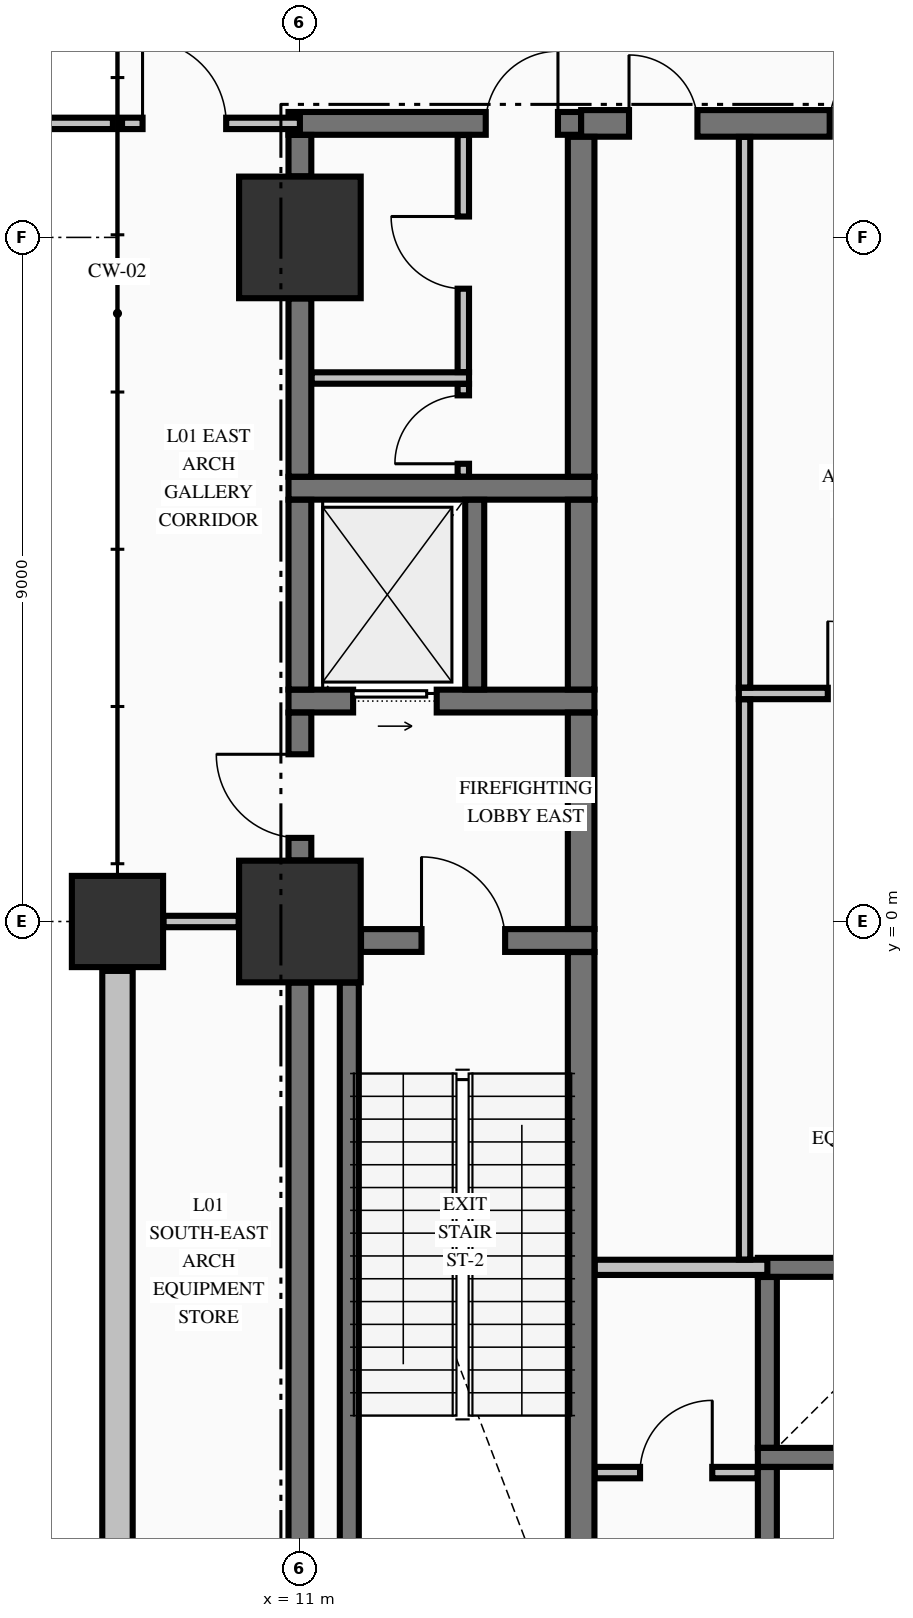
"""IFC4 building model, lengths in metres.
Left out: names, types, materials, properties, quantities, classifications, styles, units other than length and angle.
Written with IfcOpenShell. Run it as: python <this file> out.ifc"""

import sys

from ifc_helpers import new_model, si_unit, direction, frame, frame_2d, origin, origin_2d, place, context, subcontext, project, spatial, rectangle, extrude, element, fill, save


model = new_model("IFC4")
c1 = context("Model", 3, precision=1e-05, world=origin(), true_north=direction((0.0, 1.0)))
c2 = subcontext(c1, "Body", "Model", "MODEL_VIEW")
j1 = project(units=[si_unit("LENGTHUNIT", "METRE"), si_unit("PLANEANGLEUNIT", "RADIAN")], contexts=[c1])
p1 = place(None, origin())
s1 = spatial("IfcSite", under=j1, at=p1, CompositionType="ELEMENT")
p2 = place(p1, origin())
s2 = spatial("IfcBuilding", under=s1, at=p2, CompositionType="ELEMENT")
p3 = place(p2, frame((0.0, 0.0, 5.44)))
s3 = spatial("IfcBuildingStorey", under=s2, at=p3, CompositionType="ELEMENT", Elevation=5.44)
for number, where, z_axis, x_axis in (
    (1, (11.0, 0.0, 0.0), (0.0, 0.0, 1.0), (1.0, 0.0, 0.0)),
    (2, (11.0, 9.0, 0.0), (0.0, 0.0, 1.0), (1.0, 0.0, 0.0)),
):
    element("IfcColumn", number, at=place(p3, frame(where, z_axis=z_axis, x_axis=x_axis)), inside=s3, PredefinedType="COLUMN", context=c2, shape_type="SweptSolid", body=[
        extrude(rectangle(XDim=1.6, YDim=1.6, at=origin_2d()), origin(), (0.0, 0.0, 1.0), 5.09),
    ])
p4 = place(p3, frame((8.6, 0.0, 0.0), z_axis=(0.0, 0.0, 1.0), x_axis=(1.0, 0.0, 0.0)))
e3 = element("IfcColumn", 3, at=p4, inside=s3, PredefinedType="COLUMN", context=c2, shape_type="SweptSolid", body=[
    extrude(rectangle(XDim=1.2, YDim=1.2, at=origin_2d()), origin(), (0.0, 0.0, 1.0), 5.09),
])
p5 = place(p3, frame((8.6, -0.65, 0.0), z_axis=(0.0, 0.0, 1.0), x_axis=(0.0, -1.0, 0.0)))
e4 = element("IfcWall", 4, at=p5, inside=s3, PredefinedType="STANDARD", context=c2, shape_type="SweptSolid", body=[
    extrude(rectangle(XDim=24.72, YDim=0.4, at=frame_2d((12.36, 0.0))), origin(), (0.0, 0.0, 1.0), 4.132),
])
for number, where, z_axis, x_axis in (
    (5, (17.025, -7.05, 0.0), (0.0, 0.0, 1.0), (1.0, 0.0, 0.0)),
    (6, (17.025, -4.55, 0.0), (0.0, 0.0, 1.0), (1.0, 0.0, 0.0)),
):
    element("IfcWall", number, at=place(p3, frame(where, z_axis=z_axis, x_axis=x_axis)), inside=s3, PredefinedType="SOLIDWALL", context=c2, shape_type="SweptSolid", body=[
        extrude(rectangle(XDim=3.15, YDim=0.25, at=frame_2d((1.575, 0.0))), origin(), (0.0, 0.0, 1.0), 5.09),
    ])
p6 = place(p3, frame((11.804, -0.25, 0.0), z_axis=(0.0, 0.0, 1.0), x_axis=(1.0, 0.0, 0.0)))
e7 = element("IfcWall", 7, at=p6, inside=s3, PredefinedType="SHEAR", context=c2, shape_type="SweptSolid", body=[
    extrude(rectangle(XDim=3.071, YDim=0.3, at=frame_2d((1.536, 0.0))), origin(), (0.0, 0.0, 1.0), 5.09),
])
p7 = place(p6, frame((0.796, 0.0, 0.0)))
e8 = element("IfcOpeningElement", 8, at=p7, cuts=e7, PredefinedType="OPENING", context=c2, shape_type="SweptSolid", body=[
    extrude(rectangle(XDim=1.1, YDim=2.15, at=frame_2d((0.55, 1.075))), frame((0.0, 0.16, 0.0), z_axis=(0.0, -1.0, 0.0), x_axis=(1.0, 0.0, 0.0)), (0.0, 0.0, 1.0), 0.32),
])
p8 = place(p3, frame((10.85, 2.9, 0.0), z_axis=(0.0, 0.0, 1.0), x_axis=(1.0, 0.0, 0.0)))
e9 = element("IfcWall", 9, at=p8, inside=s3, PredefinedType="SHEAR", context=c2, shape_type="SweptSolid", body=[
    extrude(rectangle(XDim=4.025, YDim=0.3, at=frame_2d((2.012, 0.0))), origin(), (0.0, 0.0, 1.0), 5.09),
])
p9 = place(p8, frame((0.85, 0.0, 0.0)))
e10 = element("IfcOpeningElement", 10, at=p9, cuts=e9, PredefinedType="OPENING", context=c2, shape_type="SweptSolid", body=[
    extrude(rectangle(XDim=1.1, YDim=2.2, at=frame_2d((0.55, 1.1))), frame((0.0, 0.16, 0.0), z_axis=(0.0, -1.0, 0.0), x_axis=(1.0, 0.0, 0.0)), (0.0, 0.0, 1.0), 0.32),
])
p10 = place(p3, frame((10.85, 5.7, 0.0), z_axis=(0.0, 0.0, 1.0), x_axis=(1.0, 0.0, 0.0)))
e11 = element("IfcWall", 11, at=p10, inside=s3, PredefinedType="SHEAR", context=c2, shape_type="SweptSolid", body=[
    extrude(rectangle(XDim=4.025, YDim=0.3, at=frame_2d((2.012, 0.0))), origin(), (0.0, 0.0, 1.0), 5.09),
])
p11 = place(p3, frame((10.85, 10.5, 0.0), z_axis=(0.0, 0.0, 1.0), x_axis=(1.0, 0.0, 0.0)))
e12 = element("IfcWall", 12, at=p11, inside=s3, PredefinedType="SHEAR", context=c2, shape_type="SweptSolid", body=[
    extrude(rectangle(XDim=3.85, YDim=0.3, at=frame_2d((1.925, 0.0))), origin(), (0.0, 0.0, 1.0), 5.09),
])
p12 = place(p11, frame((2.595, 0.0, 0.0)))
e13 = element("IfcOpeningElement", 13, at=p12, cuts=e12, PredefinedType="OPENING", context=c2, shape_type="SweptSolid", body=[
    extrude(rectangle(XDim=0.95, YDim=2.15, at=frame_2d((0.475, 1.075))), frame((0.0, 0.16, 0.0), z_axis=(0.0, -1.0, 0.0), x_axis=(1.0, 0.0, 0.0)), (0.0, 0.0, 1.0), 0.32),
])
p13 = place(p3, frame((14.7, 10.5, 0.0), z_axis=(0.0, 0.0, 1.0), x_axis=(1.0, 0.0, 0.0)))
e14 = element("IfcWall", 14, at=p13, inside=s3, PredefinedType="SHEAR", context=c2, shape_type="SweptSolid", body=[
    extrude(rectangle(XDim=5.475, YDim=0.35, at=frame_2d((2.738, 0.0))), origin(), (0.0, 0.0, 1.0), 5.09),
])
p14 = place(p13, frame((0.63, 0.0, 0.0)))
e15 = element("IfcOpeningElement", 15, at=p14, cuts=e14, PredefinedType="OPENING", context=c2, shape_type="SweptSolid", body=[
    extrude(rectangle(XDim=0.9, YDim=2.15, at=frame_2d((0.45, 1.075))), frame((0.0, 0.185, 0.0), z_axis=(0.0, -1.0, 0.0), x_axis=(1.0, 0.0, 0.0)), (0.0, 0.0, 1.0), 0.37),
])
p15 = place(p13, frame((3.27, 0.0, 0.0)))
e16 = element("IfcOpeningElement", 16, at=p15, cuts=e14, PredefinedType="OPENING", context=c2, shape_type="SweptSolid", body=[
    extrude(rectangle(XDim=0.9, YDim=2.15, at=frame_2d((0.45, 1.075))), frame((0.0, 0.185, 0.0), z_axis=(0.0, -1.0, 0.0), x_axis=(1.0, 0.0, 0.0)), (0.0, 0.0, 1.0), 0.37),
])
p16 = place(p3, frame((14.878, -7.25, 0.0), z_axis=(0.0, 0.0, 1.0), x_axis=(1.0, 0.0, 0.0)))
e17 = element("IfcWall", 17, at=p16, inside=s3, PredefinedType="PARTITIONING", context=c2, shape_type="SweptSolid", body=[
    extrude(rectangle(XDim=2.144, YDim=0.15, at=frame_2d((1.072, 0.0))), origin(), (0.0, 0.0, 1.0), 5.09),
])
p17 = place(p16, frame((0.597, 0.0, 0.0)))
e18 = element("IfcOpeningElement", 18, at=p17, cuts=e17, PredefinedType="OPENING", context=c2, shape_type="SweptSolid", body=[
    extrude(rectangle(XDim=0.95, YDim=2.15, at=frame_2d((0.475, 1.075))), frame((0.0, 0.085, 0.0), z_axis=(0.0, -1.0, 0.0), x_axis=(1.0, 0.0, 0.0)), (0.0, 0.0, 1.0), 0.17),
])
p18 = place(p3, frame((14.878, -4.55, 0.0), z_axis=(0.0, 0.0, 1.0), x_axis=(1.0, 0.0, 0.0)))
e19 = element("IfcWall", 19, at=p18, inside=s3, PredefinedType="PARTITIONING", context=c2, shape_type="SweptSolid", body=[
    extrude(rectangle(XDim=2.272, YDim=0.2, at=frame_2d((1.136, 0.0))), origin(), (0.0, 0.0, 1.0), 5.09),
])
p19 = place(p3, frame((9.206, 0.0, 0.0), z_axis=(0.0, 0.0, 1.0), x_axis=(1.0, 0.0, 0.0)))
e20 = element("IfcWall", 20, at=p19, inside=s3, PredefinedType="PARTITIONING", context=c2, shape_type="SweptSolid", body=[
    extrude(rectangle(XDim=0.988, YDim=0.15, at=frame_2d((0.494, 0.0))), origin(), (0.0, 0.0, 1.0), 4.132),
])
p20 = place(p3, frame((16.775, 3.0, 0.0), z_axis=(0.0, 0.0, 1.0), x_axis=(1.0, 0.0, 0.0)))
e21 = element("IfcWall", 21, at=p20, inside=s3, PredefinedType="PARTITIONING", context=c2, shape_type="SweptSolid", body=[
    extrude(rectangle(XDim=3.047, YDim=0.15, at=frame_2d((1.523, 0.0))), origin(), (0.0, 0.0, 1.0), 5.09),
])
p21 = place(p20, frame((1.17, 0.0, 0.0)))
e22 = element("IfcOpeningElement", 22, at=p21, cuts=e21, PredefinedType="OPENING", context=c2, shape_type="SweptSolid", body=[
    extrude(rectangle(XDim=0.95, YDim=2.15, at=frame_2d((0.475, 1.075))), frame((0.0, 0.085, 0.0), z_axis=(0.0, -1.0, 0.0), x_axis=(1.0, 0.0, 0.0)), (0.0, 0.0, 1.0), 0.17),
])
p22 = place(p3, frame((11.153, 7.15, 0.0), z_axis=(0.0, 0.0, 1.0), x_axis=(1.0, 0.0, 0.0)))
e23 = element("IfcWall", 23, at=p22, inside=s3, PredefinedType="PARTITIONING", context=c2, shape_type="SweptSolid", body=[
    extrude(rectangle(XDim=2.072, YDim=0.15, at=frame_2d((1.036, 0.0))), origin(), (0.0, 0.0, 1.0), 5.09),
])
p23 = place(p3, frame((-8.54, 10.5, 0.0), z_axis=(0.0, 0.0, 1.0), x_axis=(1.0, 0.0, 0.0)))
e24 = element("IfcWall", 24, at=p23, inside=s3, PredefinedType="PARTITIONING", context=c2, shape_type="SweptSolid", body=[
    extrude(rectangle(XDim=17.08, YDim=0.15, at=frame_2d((8.54, 0.0))), origin(), (0.0, 0.0, 1.0), 5.09),
])
p24 = place(p3, frame((8.66, 10.5, 0.0), z_axis=(0.0, 0.0, 1.0), x_axis=(1.0, 0.0, 0.0)))
e25 = element("IfcWall", 25, at=p24, inside=s3, PredefinedType="PARTITIONING", context=c2, shape_type="SweptSolid", body=[
    extrude(rectangle(XDim=2.34, YDim=0.15, at=frame_2d((1.17, 0.0))), origin(), (0.0, 0.0, 1.0), 5.09),
])
p25 = place(p24, frame((0.27, 0.0, 0.0)))
e26 = element("IfcOpeningElement", 26, at=p25, cuts=e25, PredefinedType="OPENING", context=c2, shape_type="SweptSolid", body=[
    extrude(rectangle(XDim=1.1, YDim=2.15, at=frame_2d((0.55, 1.075))), frame((0.0, 0.085, 0.0), z_axis=(0.0, -1.0, 0.0), x_axis=(1.0, 0.0, 0.0)), (0.0, 0.0, 1.0), 0.17),
])
p26 = place(p3, frame((11.0, -8.196, 0.0), z_axis=(0.0, 0.0, 1.0), x_axis=(0.0, 1.0, 0.0)))
e27 = element("IfcWall", 27, at=p26, inside=s3, PredefinedType="SHEAR", context=c2, shape_type="SweptSolid", body=[
    extrude(rectangle(XDim=7.392, YDim=0.3, at=frame_2d((3.696, 0.0))), origin(), (0.0, 0.0, 1.0), 5.09),
])
p27 = place(p3, frame((11.0, 0.804, 0.0), z_axis=(0.0, 0.0, 1.0), x_axis=(0.0, 1.0, 0.0)))
e28 = element("IfcWall", 28, at=p27, inside=s3, PredefinedType="SHEAR", context=c2, shape_type="SweptSolid", body=[
    extrude(rectangle(XDim=1.944, YDim=0.3, at=frame_2d((0.972, 0.0))), origin(), (0.0, 0.0, 1.0), 5.09),
])
p28 = place(p27, frame((0.296, 0.0, 0.0)))
e29 = element("IfcOpeningElement", 29, at=p28, cuts=e28, PredefinedType="OPENING", context=c2, shape_type="SweptSolid", body=[
    extrude(rectangle(XDim=1.1, YDim=2.15, at=frame_2d((0.55, 1.075))), frame((0.0, 0.16, 0.0), z_axis=(0.0, -1.0, 0.0), x_axis=(1.0, 0.0, 0.0)), (0.0, 0.0, 1.0), 0.32),
])
p29 = place(p3, frame((11.0, 3.052, 0.0), z_axis=(0.0, 0.0, 1.0), x_axis=(0.0, 1.0, 0.0)))
e30 = element("IfcWall", 30, at=p29, inside=s3, PredefinedType="SHEAR", context=c2, shape_type="SweptSolid", body=[
    extrude(rectangle(XDim=2.496, YDim=0.3, at=frame_2d((1.248, 0.0))), origin(), (0.0, 0.0, 1.0), 5.09),
])
p30 = place(p3, frame((11.0, 5.852, 0.0), z_axis=(0.0, 0.0, 1.0), x_axis=(0.0, 1.0, 0.0)))
e31 = element("IfcWall", 31, at=p30, inside=s3, PredefinedType="SHEAR", context=c2, shape_type="SweptSolid", body=[
    extrude(rectangle(XDim=2.344, YDim=0.3, at=frame_2d((1.172, 0.0))), origin(), (0.0, 0.0, 1.0), 5.09),
])
p31 = place(p3, frame((11.0, 9.804, 0.0), z_axis=(0.0, 0.0, 1.0), x_axis=(0.0, 1.0, 0.0)))
e32 = element("IfcWall", 32, at=p31, inside=s3, PredefinedType="SHEAR", context=c2, shape_type="SweptSolid", body=[
    extrude(rectangle(XDim=0.544, YDim=0.3, at=frame_2d((0.272, 0.0))), origin(), (0.0, 0.0, 1.0), 5.09),
])
p32 = place(p3, frame((11.65, -8.196, 0.0), z_axis=(0.0, 0.0, 1.0), x_axis=(0.0, 1.0, 0.0)))
e33 = element("IfcWall", 33, at=p32, inside=s3, PredefinedType="SOLIDWALL", context=c2, shape_type="SweptSolid", body=[
    extrude(rectangle(XDim=7.392, YDim=0.25, at=frame_2d((3.696, 0.0))), origin(), (0.0, 0.0, 1.0), 5.09),
])
p33 = place(p3, frame((13.3, 3.052, 0.0), z_axis=(0.0, 0.0, 1.0), x_axis=(0.0, 1.0, 0.0)))
e34 = element("IfcWall", 34, at=p33, inside=s3, PredefinedType="SOLIDWALL", context=c2, shape_type="SweptSolid", body=[
    extrude(rectangle(XDim=2.496, YDim=0.25, at=frame_2d((1.248, 0.0))), origin(), (0.0, 0.0, 1.0), 5.09),
])
p34 = place(p3, frame((14.7, -9.773, 0.0), z_axis=(0.0, 0.0, 1.0), x_axis=(0.0, 1.0, 0.0)))
e35 = element("IfcWall", 35, at=p34, inside=s3, PredefinedType="SHEAR", context=c2, shape_type="SweptSolid", body=[
    extrude(rectangle(XDim=9.371, YDim=0.35, at=frame_2d((4.686, 0.0))), origin(), (0.0, 0.0, 1.0), 5.09),
])
p35 = place(p3, frame((14.7, -0.098, 0.0), z_axis=(0.0, 0.0, 1.0), x_axis=(0.0, 1.0, 0.0)))
e36 = element("IfcWall", 36, at=p35, inside=s3, PredefinedType="SHEAR", context=c2, shape_type="SweptSolid", body=[
    extrude(rectangle(XDim=2.846, YDim=0.35, at=frame_2d((1.423, 0.0))), origin(), (0.0, 0.0, 1.0), 5.09),
])
p36 = place(p3, frame((14.7, 3.052, 0.0), z_axis=(0.0, 0.0, 1.0), x_axis=(0.0, 1.0, 0.0)))
e37 = element("IfcWall", 37, at=p36, inside=s3, PredefinedType="SHEAR", context=c2, shape_type="SweptSolid", body=[
    extrude(rectangle(XDim=2.496, YDim=0.35, at=frame_2d((1.248, 0.0))), origin(), (0.0, 0.0, 1.0), 5.09),
])
p37 = place(p3, frame((14.7, 5.852, 0.0), z_axis=(0.0, 0.0, 1.0), x_axis=(0.0, 1.0, 0.0)))
e38 = element("IfcWall", 38, at=p37, inside=s3, PredefinedType="SHEAR", context=c2, shape_type="SweptSolid", body=[
    extrude(rectangle(XDim=4.471, YDim=0.35, at=frame_2d((2.235, 0.0))), origin(), (0.0, 0.0, 1.0), 5.09),
])
p38 = place(p3, frame((17.15, -9.773, 0.0), z_axis=(0.0, 0.0, 1.0), x_axis=(0.0, 1.0, 0.0)))
e39 = element("IfcWall", 39, at=p38, inside=s3, PredefinedType="SOLIDWALL", context=c2, shape_type="SweptSolid", body=[
    extrude(rectangle(XDim=2.596, YDim=0.25, at=frame_2d((1.298, 0.0))), origin(), (0.0, 0.0, 1.0), 5.09),
])
p39 = place(p3, frame((17.15, -6.923, 0.0), z_axis=(0.0, 0.0, 1.0), x_axis=(0.0, 1.0, 0.0)))
e40 = element("IfcWall", 40, at=p39, inside=s3, PredefinedType="SOLIDWALL", context=c2, shape_type="SweptSolid", body=[
    extrude(rectangle(XDim=2.246, YDim=0.25, at=frame_2d((1.123, 0.0))), origin(), (0.0, 0.0, 1.0), 5.09),
])
p40 = place(p3, frame((13.15, 5.853, 0.0), z_axis=(0.0, 0.0, 1.0), x_axis=(0.0, 1.0, 0.0)))
e41 = element("IfcWall", 41, at=p40, inside=s3, PredefinedType="PARTITIONING", context=c2, shape_type="SweptSolid", body=[
    extrude(rectangle(XDim=1.219, YDim=0.15, at=frame_2d((0.609, 0.0))), origin(), (0.0, 0.0, 1.0), 5.09),
])
p41 = place(p40, frame((0.169, 0.0, 0.0)))
e42 = element("IfcOpeningElement", 42, at=p41, cuts=e41, PredefinedType="OPENING", context=c2, shape_type="SweptSolid", body=[
    extrude(rectangle(XDim=0.9, YDim=2.15, at=frame_2d((0.45, 1.075))), frame((0.0, 0.085, 0.0), z_axis=(0.0, -1.0, 0.0), x_axis=(1.0, 0.0, 0.0)), (0.0, 0.0, 1.0), 0.17),
])
p42 = place(p3, frame((13.15, 7.228, 0.0), z_axis=(0.0, 0.0, 1.0), x_axis=(0.0, 1.0, 0.0)))
e43 = element("IfcWall", 43, at=p42, inside=s3, PredefinedType="PARTITIONING", context=c2, shape_type="SweptSolid", body=[
    extrude(rectangle(XDim=3.119, YDim=0.15, at=frame_2d((1.56, 0.0))), origin(), (0.0, 0.0, 1.0), 5.09),
])
p43 = place(p42, frame((1.097, 0.0, 0.0)))
e44 = element("IfcOpeningElement", 44, at=p43, cuts=e43, PredefinedType="OPENING", context=c2, shape_type="SweptSolid", body=[
    extrude(rectangle(XDim=0.95, YDim=2.15, at=frame_2d((0.475, 1.075))), frame((0.0, 0.085, 0.0), z_axis=(0.0, -1.0, 0.0), x_axis=(1.0, 0.0, 0.0)), (0.0, 0.0, 1.0), 0.17),
])
p44 = place(p3, frame((16.85, -4.447, 0.0), z_axis=(0.0, 0.0, 1.0), x_axis=(0.0, 1.0, 0.0)))
e45 = element("IfcWall", 45, at=p44, inside=s3, PredefinedType="PARTITIONING", context=c2, shape_type="SweptSolid", body=[
    extrude(rectangle(XDim=7.369, YDim=0.15, at=frame_2d((3.685, 0.0))), origin(), (0.0, 0.0, 1.0), 5.09),
])
p45 = place(p3, frame((16.85, 3.078, 0.0), z_axis=(0.0, 0.0, 1.0), x_axis=(0.0, 1.0, 0.0)))
e46 = element("IfcWall", 46, at=p45, inside=s3, PredefinedType="PARTITIONING", context=c2, shape_type="SweptSolid", body=[
    extrude(rectangle(XDim=7.244, YDim=0.15, at=frame_2d((3.622, 0.0))), origin(), (0.0, 0.0, 1.0), 5.09),
])
p46 = place(p7, origin())
e47 = element("IfcDoor", 47, at=p46, inside=s3, OperationType="SINGLE_SWING_LEFT", PredefinedType="DOOR", context=c2, shape_type="SweptSolid", body=[
    extrude(rectangle(XDim=1.1, YDim=2.15, at=frame_2d((0.55, 1.075))), frame((0.0, 0.025, 0.0), z_axis=(0.0, -1.0, 0.0), x_axis=(1.0, 0.0, 0.0)), (0.0, 0.0, 1.0), 0.05),
])
fill(e8, e47)
p47 = place(p28, origin())
e48 = element("IfcDoor", 48, at=p47, inside=s3, OperationType="SINGLE_SWING_RIGHT", PredefinedType="DOOR", context=c2, shape_type="SweptSolid", body=[
    extrude(rectangle(XDim=1.1, YDim=2.15, at=frame_2d((0.55, 1.075))), frame((0.0, 0.025, 0.0), z_axis=(0.0, -1.0, 0.0), x_axis=(1.0, 0.0, 0.0)), (0.0, 0.0, 1.0), 0.05),
])
fill(e29, e48)
p48 = place(p9, origin())
e49 = element("IfcDoor", 49, at=p48, inside=s3, OperationType="SLIDING_TO_RIGHT", PredefinedType="DOOR", context=c2, shape_type="SweptSolid", body=[
    extrude(rectangle(XDim=1.1, YDim=2.2, at=frame_2d((0.55, 1.1))), frame((0.0, 0.025, 0.0), z_axis=(0.0, -1.0, 0.0), x_axis=(1.0, 0.0, 0.0)), (0.0, 0.0, 1.0), 0.05),
])
fill(e10, e49)
p49 = place(p12, origin())
e50 = element("IfcDoor", 50, at=p49, inside=s3, OperationType="SINGLE_SWING_RIGHT", PredefinedType="DOOR", context=c2, shape_type="SweptSolid", body=[
    extrude(rectangle(XDim=0.95, YDim=2.15, at=frame_2d((0.475, 1.075))), frame((0.0, 0.025, 0.0), z_axis=(0.0, -1.0, 0.0), x_axis=(1.0, 0.0, 0.0)), (0.0, 0.0, 1.0), 0.05),
])
fill(e13, e50)
p50 = place(p41, origin())
e51 = element("IfcDoor", 51, at=p50, inside=s3, OperationType="SINGLE_SWING_LEFT", PredefinedType="DOOR", context=c2, shape_type="SweptSolid", body=[
    extrude(rectangle(XDim=0.9, YDim=2.15, at=frame_2d((0.45, 1.075))), frame((0.0, 0.025, 0.0), z_axis=(0.0, -1.0, 0.0), x_axis=(1.0, 0.0, 0.0)), (0.0, 0.0, 1.0), 0.05),
])
fill(e42, e51)
p51 = place(p43, origin())
e52 = element("IfcDoor", 52, at=p51, inside=s3, OperationType="SINGLE_SWING_RIGHT", PredefinedType="DOOR", context=c2, shape_type="SweptSolid", body=[
    extrude(rectangle(XDim=0.95, YDim=2.15, at=frame_2d((0.475, 1.075))), frame((0.0, 0.025, 0.0), z_axis=(0.0, -1.0, 0.0), x_axis=(1.0, 0.0, 0.0)), (0.0, 0.0, 1.0), 0.05),
])
fill(e44, e52)
p52 = place(p17, origin())
e53 = element("IfcDoor", 53, at=p52, inside=s3, OperationType="SINGLE_SWING_RIGHT", PredefinedType="DOOR", context=c2, shape_type="SweptSolid", body=[
    extrude(rectangle(XDim=0.95, YDim=2.15, at=frame_2d((0.475, 1.075))), frame((0.0, 0.025, 0.0), z_axis=(0.0, -1.0, 0.0), x_axis=(1.0, 0.0, 0.0)), (0.0, 0.0, 1.0), 0.05),
])
fill(e18, e53)
p53 = place(p14, origin())
e54 = element("IfcDoor", 54, at=p53, inside=s3, OperationType="SINGLE_SWING_LEFT", PredefinedType="DOOR", context=c2, shape_type="SweptSolid", body=[
    extrude(rectangle(XDim=0.9, YDim=2.15, at=frame_2d((0.45, 1.075))), frame((0.0, 0.025, 0.0), z_axis=(0.0, -1.0, 0.0), x_axis=(1.0, 0.0, 0.0)), (0.0, 0.0, 1.0), 0.05),
])
fill(e15, e54)
p54 = place(p15, origin())
e55 = element("IfcDoor", 55, at=p54, inside=s3, OperationType="SINGLE_SWING_RIGHT", PredefinedType="DOOR", context=c2, shape_type="SweptSolid", body=[
    extrude(rectangle(XDim=0.9, YDim=2.15, at=frame_2d((0.45, 1.075))), frame((0.0, 0.025, 0.0), z_axis=(0.0, -1.0, 0.0), x_axis=(1.0, 0.0, 0.0)), (0.0, 0.0, 1.0), 0.05),
])
fill(e16, e55)
p55 = place(p21, origin())
e56 = element("IfcDoor", 56, at=p55, inside=s3, OperationType="SINGLE_SWING_LEFT", PredefinedType="DOOR", context=c2, shape_type="SweptSolid", body=[
    extrude(rectangle(XDim=0.95, YDim=2.15, at=frame_2d((0.475, 1.075))), frame((0.0, 0.025, 0.0), z_axis=(0.0, -1.0, 0.0), x_axis=(1.0, 0.0, 0.0)), (0.0, 0.0, 1.0), 0.05),
])
fill(e22, e56)
p56 = place(p25, origin())
e57 = element("IfcDoor", 57, at=p56, inside=s3, OperationType="SINGLE_SWING_LEFT", PredefinedType="DOOR", context=c2, shape_type="SweptSolid", body=[
    extrude(rectangle(XDim=1.1, YDim=2.15, at=frame_2d((0.55, 1.075))), frame((0.0, 0.025, 0.0), z_axis=(0.0, -1.0, 0.0), x_axis=(1.0, 0.0, 0.0)), (0.0, 0.0, 1.0), 0.05),
])
fill(e26, e57)
save(model, sys.argv[1])
